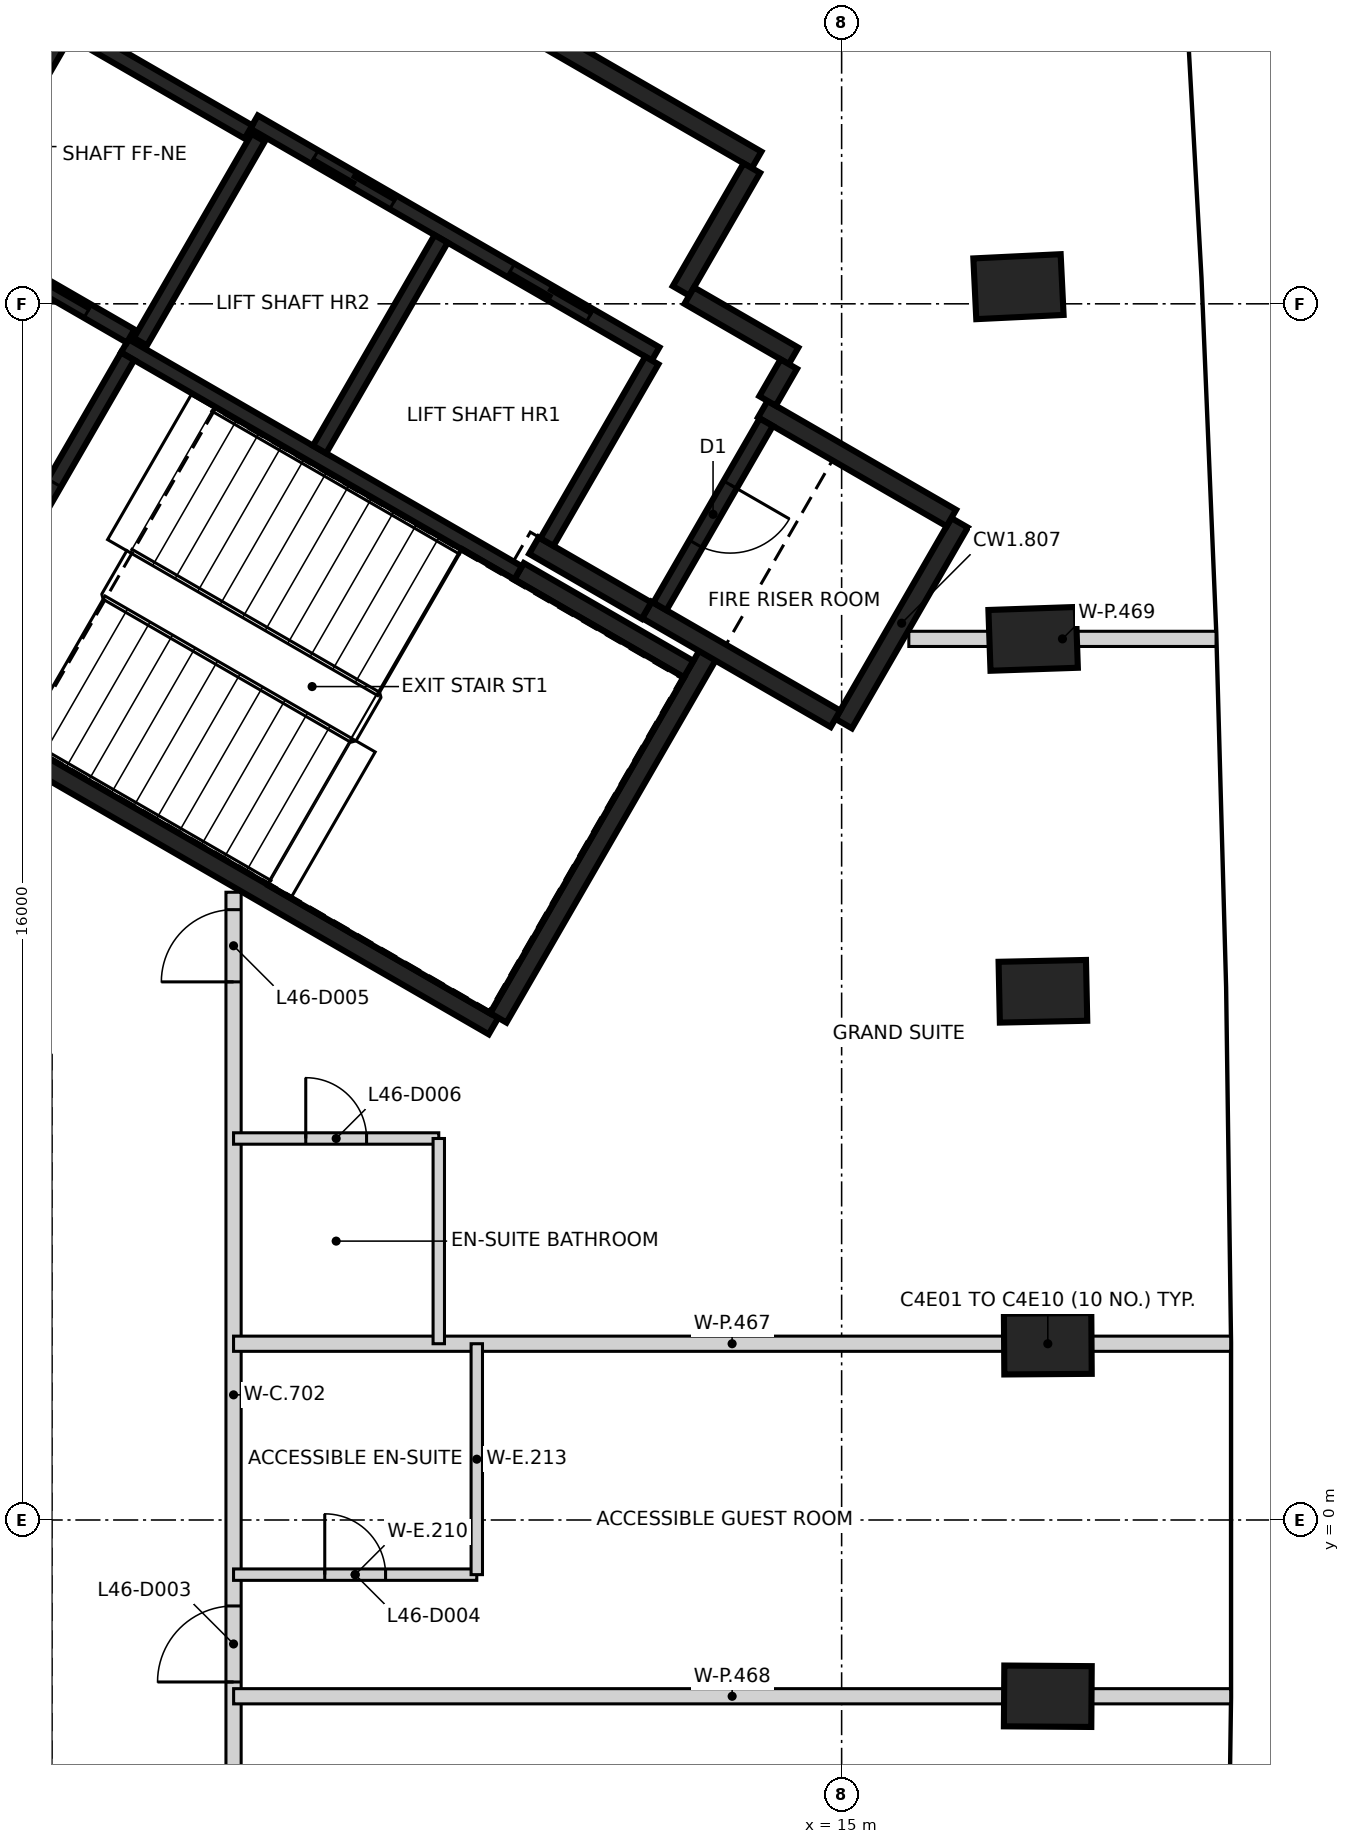
"""IFC4 building model, lengths in metres.
Left out: names, types, materials, properties, quantities, classifications, styles, units other than length and angle.
Written with IfcOpenShell. Run it as: python <this file> out.ifc"""

import sys

from ifc_helpers import new_model, si_unit, direction, frame, frame_2d, origin, origin_2d, place, context, subcontext, project, spatial, rectangle, extrude, element, fill, save


model = new_model("IFC4")
c1 = context("Model", 3, precision=1e-05, world=origin(), true_north=direction((0.0, 1.0)))
c2 = subcontext(c1, "Body", "Model", "MODEL_VIEW")
j1 = project(units=[si_unit("LENGTHUNIT", "METRE"), si_unit("PLANEANGLEUNIT", "RADIAN")], contexts=[c1])
p1 = place(None, origin())
s1 = spatial("IfcSite", under=j1, at=p1, CompositionType="ELEMENT")
p2 = place(p1, origin())
s2 = spatial("IfcBuilding", under=s1, at=p2, CompositionType="ELEMENT")
p3 = place(p2, frame((0.0, 0.0, 186.4)))
s3 = spatial("IfcBuildingStorey", under=s2, at=p3, CompositionType="ELEMENT", Elevation=186.4)
for number, where, z_axis, x_axis in (
    (1, (17.712, -2.319, -0.35), (0.0, 0.0, 1.0), (-1.0, 0.007, 0.0)),
    (2, (17.712, 2.319, -0.35), (0.0, 0.0, 1.0), (1.0, 0.007, 0.0)),
    (3, (17.648, 6.956, -0.35), (0.0, 0.0, 1.0), (1.0, 0.021, 0.0)),
    (4, (17.519, 11.592, -0.35), (0.0, 0.0, 1.0), (0.999, 0.034, 0.0)),
    (5, (17.326, 16.226, -0.35), (0.0, 0.0, 1.0), (0.999, 0.048, 0.0)),
):
    element("IfcColumn", number, at=place(p3, frame(where, z_axis=z_axis, x_axis=x_axis)), inside=s3, PredefinedType="COLUMN", context=c2, shape_type="SweptSolid", body=[
        extrude(rectangle(XDim=1.15, YDim=0.8, at=origin_2d()), origin(), (0.0, 0.0, 1.0), 3.6),
    ])
p4 = place(p3, frame((10.42, 6.498, 0.0), z_axis=(0.0, 0.0, 1.0), x_axis=(-0.866021906294, 0.500006057782, 0.0)))
e6 = element("IfcWall", 6, at=p4, inside=s3, PredefinedType="SHEAR", context=c2, shape_type="SweptSolid", body=[
    extrude(rectangle(XDim=11.55, YDim=0.25, at=frame_2d((5.775, 0.0))), origin(), (0.0, 0.0, 1.0), 3.25),
])
p5 = place(p4, frame((10.025, 0.0, 0.0)))
e7 = element("IfcOpeningElement", 7, at=p5, cuts=e6, PredefinedType="OPENING", context=c2, shape_type="SweptSolid", body=[
    extrude(rectangle(XDim=1.2, YDim=2.1, at=frame_2d((0.6, 1.05))), frame((0.0, 0.135, 0.0), z_axis=(0.0, -1.0, 0.0), x_axis=(1.0, 0.0, 0.0)), (0.0, 0.0, 1.0), 0.27),
])
p6 = place(p4, frame((8.725, 0.0, 0.0)))
e8 = element("IfcOpeningElement", 8, at=p6, cuts=e6, PredefinedType="OPENING", context=c2, shape_type="SweptSolid", body=[
    extrude(rectangle(XDim=1.2, YDim=2.1, at=frame_2d((0.6, 1.05))), frame((0.0, 0.135, 0.0), z_axis=(0.0, -1.0, 0.0), x_axis=(1.0, 0.0, 0.0)), (0.0, 0.0, 1.0), 0.27),
])
p7 = place(p3, frame((6.304, 22.269, 0.0), z_axis=(0.0, 0.0, 1.0), x_axis=(0.866022959057, -0.500004234368, 0.0)))
e9 = element("IfcWall", 9, at=p7, inside=s3, PredefinedType="SHEAR", context=c2, shape_type="SweptSolid", body=[
    extrude(rectangle(XDim=8.75, YDim=0.25, at=frame_2d((4.375, 0.0))), origin(), (0.0, 0.0, 1.0), 3.25),
])
p8 = place(p3, frame((3.179, 16.856, 0.0), z_axis=(0.0, 0.0, 1.0), x_axis=(0.500001955336, 0.866024274868, 0.0)))
e10 = element("IfcWall", 10, at=p8, inside=s3, PredefinedType="SHEAR", context=c2, shape_type="SweptSolid", body=[
    extrude(rectangle(XDim=6.125, YDim=0.25, at=frame_2d((3.062, 0.0))), origin(), (0.0, 0.0, 1.0), 3.25),
])
p9 = place(p8, frame((3.563, 0.0, 0.0)))
e11 = element("IfcOpeningElement", 11, at=p9, cuts=e10, PredefinedType="OPENING", context=c2, shape_type="SweptSolid", body=[
    extrude(rectangle(XDim=1.0, YDim=2.1, at=frame_2d((0.5, 1.05))), frame((0.0, 0.135, 0.0), z_axis=(0.0, -1.0, 0.0), x_axis=(1.0, 0.0, 0.0)), (0.0, 0.0, 1.0), 0.27),
])
p10 = place(p3, frame((13.238, 11.378, 0.0), z_axis=(0.0, 0.0, 1.0), x_axis=(-0.500008851346, -0.866020293397, 0.0)))
e12 = element("IfcWall", 12, at=p10, inside=s3, PredefinedType="SHEAR", context=c2, shape_type="SweptSolid", body=[
    extrude(rectangle(XDim=5.51, YDim=0.25, at=frame_2d((2.755, 0.0))), origin(), (0.0, 0.0, 1.0), 3.25),
])
p11 = place(p3, frame((16.552, 13.119, 0.0), z_axis=(0.0, 0.0, 1.0), x_axis=(-0.499978833458, -0.866037623948, 0.0)))
e13 = element("IfcWall", 13, at=p11, inside=s3, PredefinedType="SHEAR", context=c2, shape_type="SweptSolid", body=[
    extrude(rectangle(XDim=3.05, YDim=0.25, at=frame_2d((1.525, 0.0))), origin(), (0.0, 0.0, 1.0), 3.25),
])
p12 = place(p3, frame((14.918, 10.54, 0.0), z_axis=(0.0, 0.0, 1.0), x_axis=(-0.866063538972, 0.499933942099, 0.0)))
e14 = element("IfcWall", 14, at=p12, inside=s3, PredefinedType="SHEAR", context=c2, shape_type="SweptSolid", body=[
    extrude(rectangle(XDim=2.865, YDim=0.25, at=frame_2d((1.432, 0.0))), origin(), (0.0, 0.0, 1.0), 3.25),
])
p13 = place(p3, frame((13.963, 14.614, 0.0), z_axis=(0.0, 0.0, 1.0), x_axis=(0.866042235819, -0.499970844928, 0.0)))
e15 = element("IfcWall", 15, at=p13, inside=s3, PredefinedType="SHEAR", context=c2, shape_type="SweptSolid", body=[
    extrude(rectangle(XDim=2.865, YDim=0.25, at=frame_2d((1.432, 0.0))), origin(), (0.0, 0.0, 1.0), 3.25),
])
p14 = place(p3, frame((10.757, 12.481, 0.0), z_axis=(0.0, 0.0, 1.0), x_axis=(0.866022940537, -0.500004266446, 0.0)))
e16 = element("IfcWall", 16, at=p14, inside=s3, PredefinedType="SHEAR", context=c2, shape_type="SweptSolid", body=[
    extrude(rectangle(XDim=2.575, YDim=0.25, at=frame_2d((1.287, 0.0))), origin(), (0.0, 0.0, 1.0), 3.25),
])
p15 = place(p3, frame((13.819, 17.785, 0.0), z_axis=(0.0, 0.0, 1.0), x_axis=(-0.500039802285, -0.866002422705, 0.0)))
e17 = element("IfcWall", 17, at=p15, inside=s3, PredefinedType="SHEAR", context=c2, shape_type="SweptSolid", body=[
    extrude(rectangle(XDim=1.865, YDim=0.25, at=frame_2d((0.932, 0.0))), origin(), (0.0, 0.0, 1.0), 3.25),
])
p16 = place(p3, frame((12.433, 11.964, 0.0), z_axis=(0.0, 0.0, 1.0), x_axis=(-0.866038183914, 0.499977863513, 0.0)))
e18 = element("IfcWall", 18, at=p16, inside=s3, PredefinedType="SHEAR", context=c2, shape_type="SweptSolid", body=[
    extrude(rectangle(XDim=1.71, YDim=0.25, at=frame_2d((0.855, 0.0))), origin(), (0.0, 0.0, 1.0), 3.25),
])
p17 = place(p3, frame((12.995, 16.108, 0.0), z_axis=(0.0, 0.0, 1.0), x_axis=(0.866044474677, -0.49996696679, 0.0)))
e19 = element("IfcWall", 19, at=p17, inside=s3, PredefinedType="SHEAR", context=c2, shape_type="SweptSolid", body=[
    extrude(rectangle(XDim=1.584, YDim=0.25, at=frame_2d((0.792, 0.0))), origin(), (0.0, 0.0, 1.0), 3.25),
])
p18 = place(p3, frame((14.305, 15.207, 0.0), z_axis=(0.0, 0.0, 1.0), x_axis=(-0.499848422343, -0.866112899501, 0.0)))
e20 = element("IfcWall", 20, at=p18, inside=s3, PredefinedType="SHEAR", context=c2, shape_type="SweptSolid", body=[
    extrude(rectangle(XDim=0.559, YDim=0.25, at=frame_2d((0.28, 0.0))), origin(), (0.0, 0.0, 1.0), 3.25),
])
p19 = place(p3, frame((12.552, 15.342, 0.0), z_axis=(0.0, 0.0, 1.0), x_axis=(-0.866030299012, 0.499991521122, 0.0)))
e21 = element("IfcWall", 21, at=p19, inside=s3, PredefinedType="SHEAR", context=c2, shape_type="SweptSolid", body=[
    extrude(rectangle(XDim=6.1, YDim=0.2, at=frame_2d((3.05, 0.0))), origin(), (0.0, 0.0, 1.0), 3.25),
])
p20 = place(p19, frame((1.0, 0.0, 0.0)))
e22 = element("IfcOpeningElement", 22, at=p20, cuts=e21, PredefinedType="OPENING", context=c2, shape_type="SweptSolid", body=[
    extrude(rectangle(XDim=1.2, YDim=2.1, at=frame_2d((0.6, 1.05))), frame((0.0, 0.11, 0.0), z_axis=(0.0, -1.0, 0.0), x_axis=(1.0, 0.0, 0.0)), (0.0, 0.0, 1.0), 0.22),
])
p21 = place(p19, frame((3.982, 0.0, 0.0)))
e23 = element("IfcOpeningElement", 23, at=p21, cuts=e21, PredefinedType="OPENING", context=c2, shape_type="SweptSolid", body=[
    extrude(rectangle(XDim=1.2, YDim=2.1, at=frame_2d((0.6, 1.05))), frame((0.0, 0.11, 0.0), z_axis=(0.0, -1.0, 0.0), x_axis=(1.0, 0.0, 0.0)), (0.0, 0.0, 1.0), 0.22),
])
p22 = place(p3, frame((10.743, 12.46, 0.0), z_axis=(0.0, 0.0, 1.0), x_axis=(-0.866018848283, 0.500011354289, 0.0)))
e24 = element("IfcWall", 24, at=p22, inside=s3, PredefinedType="SHEAR", context=c2, shape_type="SweptSolid", body=[
    extrude(rectangle(XDim=5.974, YDim=0.2, at=frame_2d((2.987, 0.0))), origin(), (0.0, 0.0, 1.0), 3.25),
])
p23 = place(p3, frame((3.057, 10.895, 0.0), z_axis=(0.0, 0.0, 1.0), x_axis=(0.500027839223, 0.866009330205, 0.0)))
e25 = element("IfcWall", 25, at=p23, inside=s3, PredefinedType="SHEAR", context=c2, shape_type="SweptSolid", body=[
    extrude(rectangle(XDim=5.098, YDim=0.2, at=frame_2d((2.549, 0.0))), origin(), (0.0, 0.0, 1.0), 3.25),
])
p24 = place(p23, frame((1.774, 0.0, 0.0)))
e26 = element("IfcOpeningElement", 26, at=p24, cuts=e25, PredefinedType="OPENING", context=c2, shape_type="SweptSolid", body=[
    extrude(rectangle(XDim=1.4, YDim=2.1, at=frame_2d((0.7, 1.05))), frame((0.0, 0.11, 0.0), z_axis=(0.0, -1.0, 0.0), x_axis=(1.0, 0.0, 0.0)), (0.0, 0.0, 1.0), 0.22),
])
p25 = place(p3, frame((8.132, 14.084, 0.0), z_axis=(0.0, 0.0, 1.0), x_axis=(0.500030834389, 0.86600760081, 0.0)))
e27 = element("IfcWall", 27, at=p25, inside=s3, PredefinedType="SHEAR", context=c2, shape_type="SweptSolid", body=[
    extrude(rectangle(XDim=3.198, YDim=0.2, at=frame_2d((1.599, 0.0))), origin(), (0.0, 0.0, 1.0), 3.25),
])
p26 = place(p3, frame((14.008, 14.442, 0.0), z_axis=(0.0, 0.0, 1.0), x_axis=(-0.499986818241, -0.866033014143, 0.0)))
e28 = element("IfcWall", 28, at=p26, inside=s3, PredefinedType="SHEAR", context=c2, shape_type="SweptSolid", body=[
    extrude(rectangle(XDim=2.798, YDim=0.2, at=frame_2d((1.399, 0.0))), origin(), (0.0, 0.0, 1.0), 3.25),
])
p27 = place(p26, frame((0.949, 0.0, 0.0)))
e29 = element("IfcOpeningElement", 29, at=p27, cuts=e28, PredefinedType="OPENING", context=c2, shape_type="SweptSolid", body=[
    extrude(rectangle(XDim=0.9, YDim=2.1, at=frame_2d((0.45, 1.05))), frame((0.0, 0.11, 0.0), z_axis=(0.0, -1.0, 0.0), x_axis=(1.0, 0.0, 0.0)), (0.0, 0.0, 1.0), 0.22),
])
p28 = place(p3, frame((12.502, 15.255, 0.0), z_axis=(0.0, 0.0, 1.0), x_axis=(-0.499965018551, -0.866045599391, 0.0)))
e30 = element("IfcWall", 30, at=p28, inside=s3, PredefinedType="SHEAR", context=c2, shape_type="SweptSolid", body=[
    extrude(rectangle(XDim=2.759, YDim=0.2, at=frame_2d((1.379, 0.0))), origin(), (0.0, 0.0, 1.0), 3.25),
])
p29 = place(p3, frame((7.324, 18.187, 0.0), z_axis=(0.0, 0.0, 1.0), x_axis=(-0.499967891604, -0.866043940782, 0.0)))
e31 = element("IfcWall", 31, at=p29, inside=s3, PredefinedType="SHEAR", context=c2, shape_type="SweptSolid", body=[
    extrude(rectangle(XDim=3.1, YDim=0.2, at=frame_2d((1.55, 0.0))), origin(), (0.0, 0.0, 1.0), 3.25),
])
p30 = place(p3, frame((5.646, 15.576, 0.0), z_axis=(0.0, 0.0, 1.0), x_axis=(-0.866018407898, 0.500012117035, 0.0)))
e32 = element("IfcWall", 32, at=p30, inside=s3, PredefinedType="SHEAR", context=c2, shape_type="SweptSolid", body=[
    extrude(rectangle(XDim=2.651, YDim=0.2, at=frame_2d((1.325, 0.0))), origin(), (0.0, 0.0, 1.0), 3.25),
])
p31 = place(p30, frame((0.652, 0.0, 0.0)))
e33 = element("IfcOpeningElement", 33, at=p31, cuts=e32, PredefinedType="OPENING", context=c2, shape_type="SweptSolid", body=[
    extrude(rectangle(XDim=1.3, YDim=2.1, at=frame_2d((0.65, 1.05))), frame((0.0, 0.11, 0.0), z_axis=(0.0, -1.0, 0.0), x_axis=(1.0, 0.0, 0.0)), (0.0, 0.0, 1.0), 0.22),
])
p32 = place(p3, frame((7.196, 18.26, 0.0), z_axis=(0.0, 0.0, 1.0), x_axis=(-0.866018407898, 0.500012117035, 0.0)))
e34 = element("IfcWall", 34, at=p32, inside=s3, PredefinedType="SHEAR", context=c2, shape_type="SweptSolid", body=[
    extrude(rectangle(XDim=2.651, YDim=0.2, at=frame_2d((1.325, 0.0))), origin(), (0.0, 0.0, 1.0), 3.25),
])
p33 = place(p3, frame((7.0, -4.966, 0.0), z_axis=(0.0, 0.0, 1.0), x_axis=(0.0, 1.0, 0.0)))
e35 = element("IfcWall", 35, at=p33, inside=s3, PredefinedType="PARTITIONING", context=c2, shape_type="SweptSolid", body=[
    extrude(rectangle(XDim=13.225, YDim=0.2, at=frame_2d((6.612, 0.0))), origin(), (0.0, 0.0, 1.0), 3.25),
])
p34 = place(p33, frame((2.835, 0.0, 0.0)))
e36 = element("IfcOpeningElement", 36, at=p34, cuts=e35, PredefinedType="OPENING", context=c2, shape_type="SweptSolid", body=[
    extrude(rectangle(XDim=1.0, YDim=2.1, at=frame_2d((0.5, 1.05))), frame((0.0, 0.11, 0.0), z_axis=(0.0, -1.0, 0.0), x_axis=(1.0, 0.0, 0.0)), (0.0, 0.0, 1.0), 0.22),
])
p35 = place(p33, frame((12.045, 0.0, 0.0)))
e37 = element("IfcOpeningElement", 37, at=p35, cuts=e35, PredefinedType="OPENING", context=c2, shape_type="SweptSolid", body=[
    extrude(rectangle(XDim=0.95, YDim=2.1, at=frame_2d((0.475, 1.05))), frame((0.0, 0.11, 0.0), z_axis=(0.0, -1.0, 0.0), x_axis=(1.0, 0.0, 0.0)), (0.0, 0.0, 1.0), 0.22),
])
p36 = place(p3, frame((7.0, 2.319, 0.0), z_axis=(0.0, 0.0, 1.0), x_axis=(1.0, 0.0, 0.0)))
e38 = element("IfcWall", 38, at=p36, inside=s3, PredefinedType="PARTITIONING", context=c2, shape_type="SweptSolid", body=[
    extrude(rectangle(XDim=13.118, YDim=0.2, at=frame_2d((6.559, 0.0))), origin(), (0.0, 0.0, 1.0), 3.25),
])
p37 = place(p3, frame((7.001, -2.319, 0.0), z_axis=(0.0, 0.0, 1.0), x_axis=(1.0, 0.0, 0.0)))
e39 = element("IfcWall", 39, at=p37, inside=s3, PredefinedType="PARTITIONING", context=c2, shape_type="SweptSolid", body=[
    extrude(rectangle(XDim=13.117, YDim=0.2, at=frame_2d((6.559, 0.0))), origin(), (0.0, 0.0, 1.0), 3.25),
])
p38 = place(p3, frame((15.884, 11.592, 0.0), z_axis=(0.0, 0.0, 1.0), x_axis=(1.0, 0.0, 0.0)))
e40 = element("IfcWall", 40, at=p38, inside=s3, PredefinedType="PARTITIONING", context=c2, shape_type="SweptSolid", body=[
    extrude(rectangle(XDim=4.042, YDim=0.2, at=frame_2d((2.021, 0.0))), origin(), (0.0, 0.0, 1.0), 3.25),
])
p39 = place(p3, frame((7.0, -0.719, 0.0), z_axis=(0.0, 0.0, 1.0), x_axis=(1.0, 0.0, 0.0)))
e41 = element("IfcWall", 41, at=p39, inside=s3, PredefinedType="PARTITIONING", context=c2, shape_type="SweptSolid", body=[
    extrude(rectangle(XDim=3.2, YDim=0.15, at=frame_2d((1.6, 0.0))), origin(), (0.0, 0.0, 1.0), 3.25),
])
p40 = place(p39, frame((1.2, 0.0, 0.0)))
e42 = element("IfcOpeningElement", 42, at=p40, cuts=e41, PredefinedType="OPENING", context=c2, shape_type="SweptSolid", body=[
    extrude(rectangle(XDim=0.8, YDim=2.1, at=frame_2d((0.4, 1.05))), frame((0.0, 0.085, 0.0), z_axis=(0.0, -1.0, 0.0), x_axis=(1.0, 0.0, 0.0)), (0.0, 0.0, 1.0), 0.17),
])
p41 = place(p3, frame((7.0, 5.019, 0.0), z_axis=(0.0, 0.0, 1.0), x_axis=(1.0, 0.0, 0.0)))
e43 = element("IfcWall", 43, at=p41, inside=s3, PredefinedType="PARTITIONING", context=c2, shape_type="SweptSolid", body=[
    extrude(rectangle(XDim=2.7, YDim=0.15, at=frame_2d((1.35, 0.0))), origin(), (0.0, 0.0, 1.0), 3.25),
])
p42 = place(p41, frame((0.95, 0.0, 0.0)))
e44 = element("IfcOpeningElement", 44, at=p42, cuts=e43, PredefinedType="OPENING", context=c2, shape_type="SweptSolid", body=[
    extrude(rectangle(XDim=0.8, YDim=2.1, at=frame_2d((0.4, 1.05))), frame((0.0, 0.085, 0.0), z_axis=(0.0, -1.0, 0.0), x_axis=(1.0, 0.0, 0.0)), (0.0, 0.0, 1.0), 0.17),
])
p43 = place(p3, frame((9.7, 2.319, 0.0), z_axis=(0.0, 0.0, 1.0), x_axis=(0.0, 1.0, 0.0)))
e45 = element("IfcWall", 45, at=p43, inside=s3, PredefinedType="PARTITIONING", context=c2, shape_type="SweptSolid", body=[
    extrude(rectangle(XDim=2.7, YDim=0.15, at=frame_2d((1.35, 0.0))), origin(), (0.0, 0.0, 1.0), 3.25),
])
p44 = place(p3, frame((10.2, -0.719, 0.0), z_axis=(0.0, 0.0, 1.0), x_axis=(0.0, 1.0, 0.0)))
e46 = element("IfcWall", 46, at=p44, inside=s3, PredefinedType="PARTITIONING", context=c2, shape_type="SweptSolid", body=[
    extrude(rectangle(XDim=3.038, YDim=0.15, at=frame_2d((1.519, 0.0))), origin(), (0.0, 0.0, 1.0), 3.25),
])
p45 = place(p31, origin())
e47 = element("IfcDoor", 47, at=p45, inside=s3, OperationType="SLIDING_TO_LEFT", PredefinedType="DOOR", context=c2, shape_type="SweptSolid", body=[
    extrude(rectangle(XDim=1.3, YDim=2.1, at=frame_2d((0.65, 1.05))), frame((0.0, 0.025, 0.0), z_axis=(0.0, -1.0, 0.0), x_axis=(1.0, 0.0, 0.0)), (0.0, 0.0, 1.0), 0.05),
])
fill(e33, e47)
p46 = place(p20, origin())
e48 = element("IfcDoor", 48, at=p46, inside=s3, OperationType="DOUBLE_DOOR_SLIDING", PredefinedType="DOOR", context=c2, shape_type="SweptSolid", body=[
    extrude(rectangle(XDim=1.2, YDim=2.1, at=frame_2d((0.6, 1.05))), frame((0.0, 0.025, 0.0), z_axis=(0.0, -1.0, 0.0), x_axis=(1.0, 0.0, 0.0)), (0.0, 0.0, 1.0), 0.05),
])
fill(e22, e48)
p47 = place(p21, origin())
e49 = element("IfcDoor", 49, at=p47, inside=s3, OperationType="DOUBLE_DOOR_SLIDING", PredefinedType="DOOR", context=c2, shape_type="SweptSolid", body=[
    extrude(rectangle(XDim=1.2, YDim=2.1, at=frame_2d((0.6, 1.05))), frame((0.0, 0.025, 0.0), z_axis=(0.0, -1.0, 0.0), x_axis=(1.0, 0.0, 0.0)), (0.0, 0.0, 1.0), 0.05),
])
fill(e23, e49)
p48 = place(p24, origin())
e50 = element("IfcDoor", 50, at=p48, inside=s3, OperationType="SINGLE_SWING_LEFT", PredefinedType="DOOR", context=c2, shape_type="SweptSolid", body=[
    extrude(rectangle(XDim=1.4, YDim=2.1, at=frame_2d((0.7, 1.05))), frame((0.0, 0.025, 0.0), z_axis=(0.0, -1.0, 0.0), x_axis=(1.0, 0.0, 0.0)), (0.0, 0.0, 1.0), 0.05),
])
fill(e26, e50)
p49 = place(p27, origin())
e51 = element("IfcDoor", 51, at=p49, inside=s3, OperationType="SINGLE_SWING_RIGHT", PredefinedType="DOOR", context=c2, shape_type="SweptSolid", body=[
    extrude(rectangle(XDim=0.9, YDim=2.1, at=frame_2d((0.45, 1.05))), frame((0.0, 0.025, 0.0), z_axis=(0.0, -1.0, 0.0), x_axis=(1.0, 0.0, 0.0)), (0.0, 0.0, 1.0), 0.05),
])
fill(e29, e51)
p50 = place(p34, frame((1.0, 0.0, 0.0), z_axis=(0.0, 0.0, 1.0), x_axis=(-1.0, 0.0, 0.0)))
e52 = element("IfcDoor", 52, at=p50, inside=s3, OperationType="SINGLE_SWING_LEFT", PredefinedType="DOOR", context=c2, shape_type="SweptSolid", body=[
    extrude(rectangle(XDim=1.0, YDim=2.1, at=frame_2d((0.5, 1.05))), frame((0.0, 0.025, 0.0), z_axis=(0.0, -1.0, 0.0), x_axis=(1.0, 0.0, 0.0)), (0.0, 0.0, 1.0), 0.05),
])
fill(e36, e52)
p51 = place(p40, origin())
e53 = element("IfcDoor", 53, at=p51, inside=s3, OperationType="SINGLE_SWING_LEFT", PredefinedType="DOOR", context=c2, shape_type="SweptSolid", body=[
    extrude(rectangle(XDim=0.8, YDim=2.1, at=frame_2d((0.4, 1.05))), frame((0.0, 0.025, 0.0), z_axis=(0.0, -1.0, 0.0), x_axis=(1.0, 0.0, 0.0)), (0.0, 0.0, 1.0), 0.05),
])
fill(e42, e53)
p52 = place(p35, frame((0.95, 0.0, 0.0), z_axis=(0.0, 0.0, 1.0), x_axis=(-1.0, 0.0, 0.0)))
e54 = element("IfcDoor", 54, at=p52, inside=s3, OperationType="SINGLE_SWING_LEFT", PredefinedType="DOOR", context=c2, shape_type="SweptSolid", body=[
    extrude(rectangle(XDim=0.95, YDim=2.1, at=frame_2d((0.475, 1.05))), frame((0.0, 0.025, 0.0), z_axis=(0.0, -1.0, 0.0), x_axis=(1.0, 0.0, 0.0)), (0.0, 0.0, 1.0), 0.05),
])
fill(e37, e54)
p53 = place(p42, origin())
e55 = element("IfcDoor", 55, at=p53, inside=s3, OperationType="SINGLE_SWING_LEFT", PredefinedType="DOOR", context=c2, shape_type="SweptSolid", body=[
    extrude(rectangle(XDim=0.8, YDim=2.1, at=frame_2d((0.4, 1.05))), frame((0.0, 0.025, 0.0), z_axis=(0.0, -1.0, 0.0), x_axis=(1.0, 0.0, 0.0)), (0.0, 0.0, 1.0), 0.05),
])
fill(e44, e55)
save(model, sys.argv[1])
